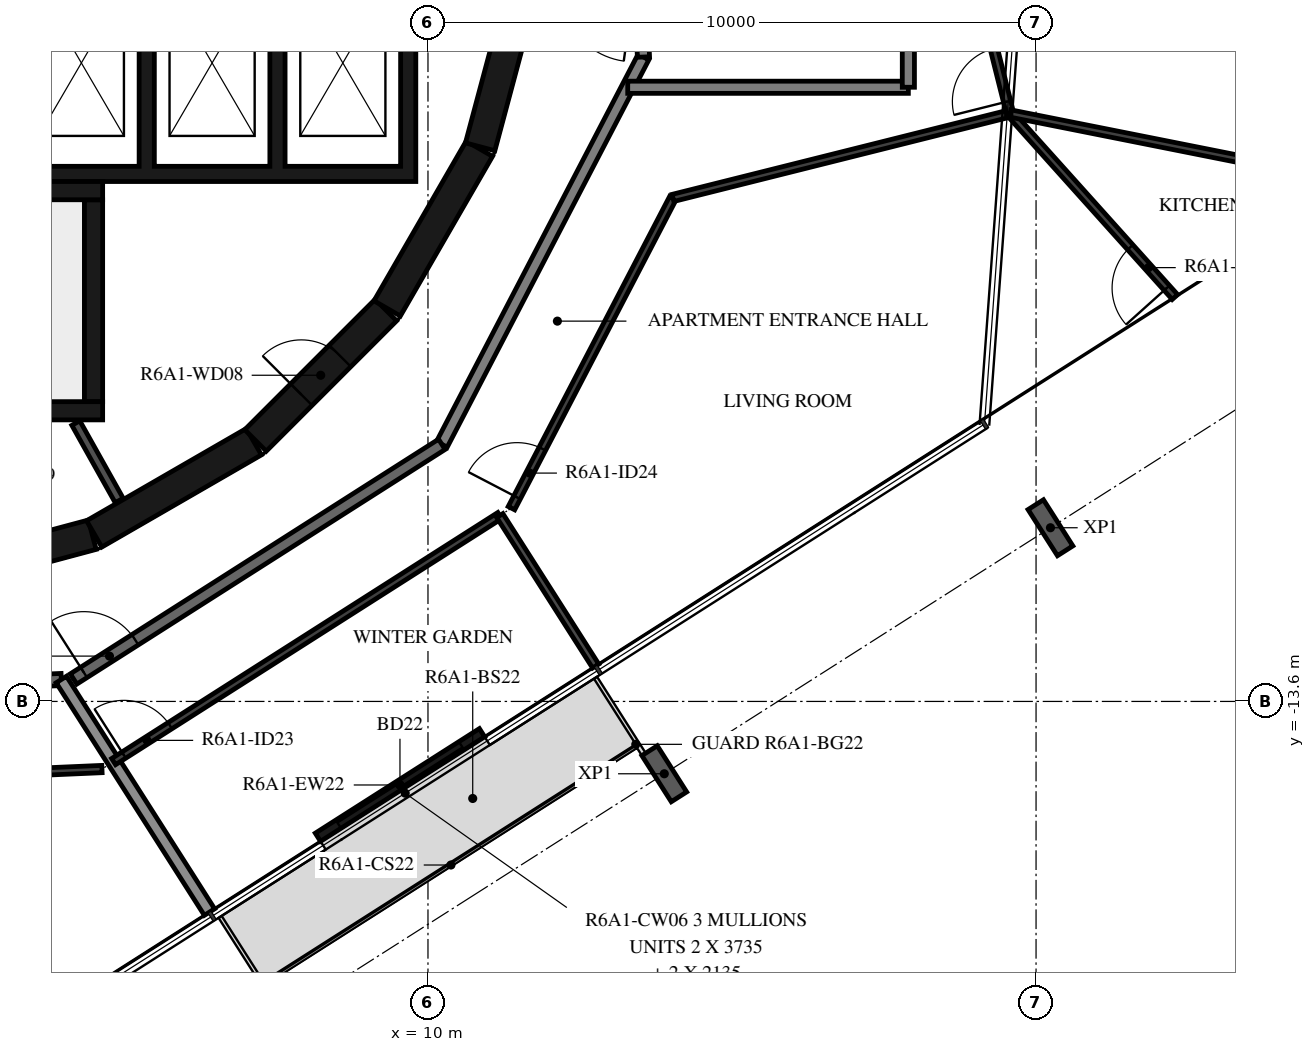
"""IFC4 building model, lengths in metres.
Left out: names, types, materials, properties, quantities, classifications, styles, units other than length and angle.
Written with IfcOpenShell. Run it as: python <this file> out.ifc"""

import sys

from ifc_helpers import new_model, si_unit, direction, frame, frame_2d, origin, origin_2d, place, context, subcontext, project, spatial, polyline, rectangle, i_section, outline, extrude, element, fill, save


model = new_model("IFC4")
c1 = context("Model", 3, precision=1e-05, world=origin(), true_north=direction((0.0, 1.0)))
c2 = subcontext(c1, "Body", "Model", "MODEL_VIEW")
j1 = project(units=[si_unit("LENGTHUNIT", "METRE"), si_unit("PLANEANGLEUNIT", "RADIAN")], contexts=[c1])
p1 = place(None, origin())
s1 = spatial("IfcSite", under=j1, at=p1, CompositionType="ELEMENT")
p2 = place(p1, origin())
s2 = spatial("IfcBuilding", under=s1, at=p2, CompositionType="ELEMENT")
p3 = place(p2, frame((0.0, 0.0, 230.2)))
s3 = spatial("IfcBuildingStorey", under=s2, at=p3, CompositionType="ELEMENT", Elevation=230.2)
for number, where, z_axis, x_axis in (
    (1, (13.886, -14.79, -0.38), (0.0, 0.0, 1.0), (-0.843, -0.537, 0.0)),
    (2, (20.237, -10.744, -0.38), (0.0, 0.0, 1.0), (-0.843, -0.537, 0.0)),
):
    element("IfcColumn", number, at=place(p3, frame(where, z_axis=z_axis, x_axis=x_axis)), inside=s3, PredefinedType="COLUMN", context=c2, shape_type="SweptSolid", body=[
        extrude(i_section(OverallWidth=0.3, OverallDepth=0.9, WebThickness=0.019, FlangeThickness=0.035, FilletRadius=0.03, at=origin_2d()), origin(), (0.0, 0.0, 1.0), 3.5),
    ])
p4 = place(p3, frame((8.19, -15.833, 0.0), z_axis=(0.0, 0.0, 1.0), x_axis=(0.843419508298, 0.53725555653, 0.0)))
e3 = element("IfcWall", 3, at=p4, inside=s3, PredefinedType="STANDARD", context=c2, shape_type="SweptSolid", body=[
    extrude(rectangle(XDim=3.2, YDim=0.16, at=frame_2d((1.6, 0.0))), origin(), (0.0, 0.0, 1.0), 3.12),
])
p5 = place(p4, frame((0.4, 0.0, 0.0)))
e4 = element("IfcOpeningElement", 4, at=p5, cuts=e3, PredefinedType="OPENING", context=c2, shape_type="SweptSolid", body=[
    extrude(rectangle(XDim=2.4, YDim=2.4, at=frame_2d((1.2, 1.2))), frame((0.0, 0.09, 0.0), z_axis=(0.0, -1.0, 0.0), x_axis=(1.0, 0.0, 0.0)), (0.0, 0.0, 1.0), 0.18),
])
p6 = place(p3, frame((1.55, -11.643, 0.0), z_axis=(0.0, 0.0, 1.0), x_axis=(0.965948410781, 0.258734743916, 0.0)))
e5 = element("IfcWall", 5, at=p6, inside=s3, PredefinedType="SHEAR", context=c2, shape_type="SweptSolid", body=[
    extrude(rectangle(XDim=3.033, YDim=0.5, at=frame_2d((1.516, 0.0))), origin(), (0.0, 0.0, 1.0), 3.12),
])
p7 = place(p6, frame((1.066, 0.0, 0.0)))
e6 = element("IfcOpeningElement", 6, at=p7, cuts=e5, PredefinedType="OPENING", context=c2, shape_type="SweptSolid", body=[
    extrude(rectangle(XDim=0.9, YDim=2.1, at=frame_2d((0.45, 1.05))), frame((0.0, 0.26, 0.0), z_axis=(0.0, -1.0, 0.0), x_axis=(1.0, 0.0, 0.0)), (0.0, 0.0, 1.0), 0.52),
])
p8 = place(p3, frame((4.51, -10.845, 0.0), z_axis=(0.0, 0.0, 1.0), x_axis=(0.865975092491, 0.500087131594, 0.0)))
e7 = element("IfcWall", 7, at=p8, inside=s3, PredefinedType="SHEAR", context=c2, shape_type="SweptSolid", body=[
    extrude(rectangle(XDim=3.033, YDim=0.5, at=frame_2d((1.516, 0.0))), origin(), (0.0, 0.0, 1.0), 3.12),
])
p9 = place(p3, frame((7.164, -9.308, 0.0), z_axis=(0.0, 0.0, 1.0), x_axis=(0.707106781187, 0.707106781187, 0.0)))
e8 = element("IfcWall", 8, at=p9, inside=s3, PredefinedType="SHEAR", context=c2, shape_type="SweptSolid", body=[
    extrude(rectangle(XDim=3.032, YDim=0.5, at=frame_2d((1.516, 0.0))), origin(), (0.0, 0.0, 1.0), 3.12),
])
p10 = place(p9, frame((1.066, 0.0, 0.0)))
e9 = element("IfcOpeningElement", 9, at=p10, cuts=e8, PredefinedType="OPENING", context=c2, shape_type="SweptSolid", body=[
    extrude(rectangle(XDim=0.9, YDim=2.1, at=frame_2d((0.45, 1.05))), frame((0.0, 0.26, 0.0), z_axis=(0.0, -1.0, 0.0), x_axis=(1.0, 0.0, 0.0)), (0.0, 0.0, 1.0), 0.52),
])
for number, where, z_axis, x_axis in (
    (10, (9.329, -7.137, 0.0), (0.0, 0.0, 1.0), (0.5, 0.866, 0.0)),
    (11, (10.858, -4.479, 0.0), (0.0, 0.0, 1.0), (0.259, 0.966, 0.0)),
):
    element("IfcWall", number, at=place(p3, frame(where, z_axis=z_axis, x_axis=x_axis)), inside=s3, PredefinedType="SHEAR", context=c2, shape_type="SweptSolid", body=[
        extrude(rectangle(XDim=3.033, YDim=0.5, at=frame_2d((1.516, 0.0))), origin(), (0.0, 0.0, 1.0), 3.12),
    ])
p11 = place(p3, frame((-2.4, -5.2, 0.0), z_axis=(0.0, 0.0, 1.0), x_axis=(1.0, 0.0, 0.0)))
e12 = element("IfcWall", 12, at=p11, inside=s3, PredefinedType="SHEAR", context=c2, shape_type="SweptSolid", body=[
    extrude(rectangle(XDim=7.05, YDim=0.3, at=frame_2d((3.525, 0.0))), origin(), (0.0, 0.0, 1.0), 3.12),
])
p12 = place(p3, frame((4.5, -8.67, 0.0), z_axis=(0.0, 0.0, 1.0), x_axis=(0.0, 1.0, 0.0)))
e13 = element("IfcWall", 13, at=p12, inside=s3, PredefinedType="SHEAR", context=c2, shape_type="SweptSolid", body=[
    extrude(rectangle(XDim=3.32, YDim=0.3, at=frame_2d((1.66, 0.0))), origin(), (0.0, 0.0, 1.0), 3.12),
])
p13 = place(p3, frame((0.1, -8.82, 0.0), z_axis=(0.0, 0.0, 1.0), x_axis=(1.0, 0.0, 0.0)))
e14 = element("IfcWall", 14, at=p13, inside=s3, PredefinedType="SHEAR", context=c2, shape_type="SweptSolid", body=[
    extrude(rectangle(XDim=4.55, YDim=0.3, at=frame_2d((2.275, 0.0))), origin(), (0.0, 0.0, 1.0), 3.12),
])
p14 = place(p3, origin())
e15 = element("IfcWall", 15, at=p14, inside=s3, PredefinedType="SHEAR", context=c2, shape_type="SweptSolid", body=[
    extrude(outline(polyline([(9.8, -5.05), (9.8, -4.8), (9.8, -1.9), (9.55, -1.9), (9.55, -4.8), (7.65, -4.8), (7.65, -1.9), (7.4, -1.9), (7.4, -4.8), (5.5, -4.8), (5.5, -1.9), (5.25, -1.9), (5.25, -4.8), (3.35, -4.8), (3.35, -1.9), (3.1, -1.9), (3.1, -4.8), (1.2, -4.8), (1.2, -1.9), (0.95, -1.9), (0.95, -4.8), (-0.95, -4.8), (-0.95, -1.9), (-1.2, -1.9), (-1.2, -4.8), (-5.25, -4.8), (-5.25, -1.9), (-5.5, -1.9), (-5.5, -4.8), (-7.4, -4.8), (-7.4, -1.9), (-7.65, -1.9), (-7.65, -4.8), (-9.55, -4.8), (-9.55, -1.9), (-9.8, -1.9), (-9.8, -4.8), (-9.8, -5.05), (9.8, -5.05)])), origin(), (0.0, 0.0, 1.0), 3.12),
])
p15 = place(p3, frame((4.922, -10.296, 0.0), z_axis=(0.0, 0.0, 1.0), x_axis=(-0.48860846254, 0.872503163509, 0.0)))
e16 = element("IfcWall", 16, at=p15, inside=s3, PredefinedType="PARTITIONING", context=c2, shape_type="SweptSolid", body=[
    extrude(rectangle(XDim=1.459, YDim=0.15, at=frame_2d((0.73, 0.0))), origin(), (0.0, 0.0, 1.0), 3.12),
])
p16 = place(p3, frame((10.228, -9.372, 0.0), z_axis=(0.0, 0.0, 1.0), x_axis=(0.461759464021, 0.887005184532, 0.0)))
e17 = element("IfcWall", 17, at=p16, inside=s3, PredefinedType="STANDARD", context=c2, shape_type="SweptSolid", body=[
    extrude(rectangle(XDim=7.181, YDim=0.2, at=frame_2d((3.591, 0.0))), origin(), (0.0, 0.0, 1.0), 3.12),
])
p17 = place(p3, frame((13.544, -3.003, 0.0), z_axis=(0.0, 0.0, 1.0), x_axis=(-0.043666917606, 0.999046145234, 0.0)))
e18 = element("IfcWall", 18, at=p17, inside=s3, PredefinedType="STANDARD", context=c2, shape_type="SweptSolid", body=[
    extrude(rectangle(XDim=1.107, YDim=0.2, at=frame_2d((0.553, 0.0))), origin(), (0.0, 0.0, 1.0), 3.12),
])
p18 = place(p3, frame((-3.003, -13.544, 0.0), z_axis=(0.0, 0.0, 1.0), x_axis=(0.999048221872, 0.043619380718, 0.0)))
e19 = element("IfcWall", 19, at=p18, inside=s3, PredefinedType="STANDARD", context=c2, shape_type="SweptSolid", body=[
    extrude(rectangle(XDim=6.979, YDim=0.2, at=frame_2d((3.49, 0.0))), origin(), (0.0, 0.0, 1.0), 3.12),
])
p19 = place(p18, frame((1.6, 0.0, 0.0)))
e20 = element("IfcOpeningElement", 20, at=p19, cuts=e19, PredefinedType="OPENING", context=c2, shape_type="SweptSolid", body=[
    extrude(rectangle(XDim=1.0, YDim=2.1, at=frame_2d((0.5, 1.05))), frame((0.0, 0.11, 0.0), z_axis=(0.0, -1.0, 0.0), x_axis=(1.0, 0.0, 0.0)), (0.0, 0.0, 1.0), 0.22),
])
p20 = place(p3, frame((4.172, -13.231, 0.0), z_axis=(0.0, 0.0, 1.0), x_axis=(0.843388394728, 0.537304397561, 0.0)))
e21 = element("IfcWall", 21, at=p20, inside=s3, PredefinedType="STANDARD", context=c2, shape_type="SweptSolid", body=[
    extrude(rectangle(XDim=7.181, YDim=0.2, at=frame_2d((3.59, 0.0))), origin(), (0.0, 0.0, 1.0), 3.12),
])
p21 = place(p20, frame((0.2, 0.0, 0.0)))
e22 = element("IfcOpeningElement", 22, at=p21, cuts=e21, PredefinedType="OPENING", context=c2, shape_type="SweptSolid", body=[
    extrude(rectangle(XDim=1.0, YDim=2.1, at=frame_2d((0.5, 1.05))), frame((0.0, 0.11, 0.0), z_axis=(0.0, -1.0, 0.0), x_axis=(1.0, 0.0, 0.0)), (0.0, 0.0, 1.0), 0.22),
])
p22 = place(p3, frame((13.285, -3.5, 0.0), z_axis=(0.0, 0.0, 1.0), x_axis=(1.0, 0.0, 0.0)))
e23 = element("IfcWall", 23, at=p22, inside=s3, PredefinedType="STANDARD", context=c2, shape_type="SweptSolid", body=[
    extrude(rectangle(XDim=4.615, YDim=0.2, at=frame_2d((2.308, 0.0))), origin(), (0.0, 0.0, 1.0), 3.12),
])
p23 = place(p3, frame((17.9, -3.5, 0.0), z_axis=(0.0, 0.0, 1.0), x_axis=(0.0, 1.0, 0.0)))
e24 = element("IfcWall", 24, at=p23, inside=s3, PredefinedType="STANDARD", context=c2, shape_type="SweptSolid", body=[
    extrude(rectangle(XDim=1.728, YDim=0.2, at=frame_2d((0.864, 0.0))), origin(), (0.0, 0.0, 1.0), 3.12),
])
p24 = place(p3, frame((6.407, -17.064, 0.0), z_axis=(0.0, 0.0, 1.0), x_axis=(-0.537324777979, 0.843375410461, 0.0)))
e25 = element("IfcWall", 25, at=p24, inside=s3, PredefinedType="STANDARD", context=c2, shape_type="SweptSolid", body=[
    extrude(rectangle(XDim=4.535, YDim=0.2, at=frame_2d((2.268, 0.0))), origin(), (0.0, 0.0, 1.0), 2.73),
])
p25 = place(p3, frame((-3.339, -15.06, 0.0), z_axis=(0.0, 0.0, 1.0), x_axis=(0.999047716945, 0.043630943905, 0.0)))
e26 = element("IfcWall", 26, at=p25, inside=s3, PredefinedType="PARTITIONING", context=c2, shape_type="SweptSolid", body=[
    extrude(rectangle(XDim=7.985, YDim=0.12, at=frame_2d((3.992, 0.0))), origin(), (0.0, 0.0, 1.0), 3.12),
])
p26 = place(p25, frame((3.654, 0.0, 0.0)))
e27 = element("IfcOpeningElement", 27, at=p26, cuts=e26, PredefinedType="OPENING", context=c2, shape_type="SweptSolid", body=[
    extrude(rectangle(XDim=0.9, YDim=2.1, at=frame_2d((0.45, 1.05))), frame((0.0, 0.07, 0.0), z_axis=(0.0, -1.0, 0.0), x_axis=(1.0, 0.0, 0.0)), (0.0, 0.0, 1.0), 0.14),
])
p27 = place(p3, frame((4.83, -14.59, 0.0), z_axis=(0.0, 0.0, 1.0), x_axis=(0.843393042763, 0.537297101629, 0.0)))
e28 = element("IfcWall", 28, at=p27, inside=s3, PredefinedType="PARTITIONING", context=c2, shape_type="SweptSolid", body=[
    extrude(rectangle(XDim=7.53, YDim=0.12, at=frame_2d((3.765, 0.0))), origin(), (0.0, 0.0, 1.0), 3.12),
])
p28 = place(p27, frame((0.2, 0.0, 0.0)))
e29 = element("IfcOpeningElement", 29, at=p28, cuts=e28, PredefinedType="OPENING", context=c2, shape_type="SweptSolid", body=[
    extrude(rectangle(XDim=0.9, YDim=2.1, at=frame_2d((0.45, 1.05))), frame((0.0, 0.07, 0.0), z_axis=(0.0, -1.0, 0.0), x_axis=(1.0, 0.0, 0.0)), (0.0, 0.0, 1.0), 0.14),
])
p29 = place(p3, frame((11.373, -10.421, 0.0), z_axis=(0.0, 0.0, 1.0), x_axis=(0.461738939635, 0.887015868869, 0.0)))
e30 = element("IfcWall", 30, at=p29, inside=s3, PredefinedType="PARTITIONING", context=c2, shape_type="SweptSolid", body=[
    extrude(rectangle(XDim=5.752, YDim=0.12, at=frame_2d((2.876, 0.0))), origin(), (0.0, 0.0, 1.0), 3.12),
])
p30 = place(p29, frame((0.2, 0.0, 0.0)))
e31 = element("IfcOpeningElement", 31, at=p30, cuts=e30, PredefinedType="OPENING", context=c2, shape_type="SweptSolid", body=[
    extrude(rectangle(XDim=0.9, YDim=2.1, at=frame_2d((0.45, 1.05))), frame((0.0, 0.07, 0.0), z_axis=(0.0, -1.0, 0.0), x_axis=(1.0, 0.0, 0.0)), (0.0, 0.0, 1.0), 0.14),
])
p31 = place(p3, frame((14.029, -5.32, 0.0), z_axis=(0.0, 0.0, 1.0), x_axis=(0.969999099814, 0.243108507378, 0.0)))
e32 = element("IfcWall", 32, at=p31, inside=s3, PredefinedType="PARTITIONING", context=c2, shape_type="SweptSolid", body=[
    extrude(rectangle(XDim=5.715, YDim=0.12, at=frame_2d((2.857, 0.0))), origin(), (0.0, 0.0, 1.0), 3.12),
])
p32 = place(p3, frame((19.573, -3.93, 0.0), z_axis=(0.0, 0.0, 1.0), x_axis=(-0.243155959183, 0.96998720585, 0.0)))
e33 = element("IfcWall", 33, at=p32, inside=s3, PredefinedType="PARTITIONING", context=c2, shape_type="SweptSolid", body=[
    extrude(rectangle(XDim=2.5, YDim=0.12, at=frame_2d((1.25, 0.0))), origin(), (0.0, 0.0, 1.0), 3.12),
])
p33 = place(p32, frame((0.2, 0.0, 0.0)))
e34 = element("IfcOpeningElement", 34, at=p33, cuts=e33, PredefinedType="OPENING", context=c2, shape_type="SweptSolid", body=[
    extrude(rectangle(XDim=0.9, YDim=2.1, at=frame_2d((0.45, 1.05))), frame((0.0, 0.07, 0.0), z_axis=(0.0, -1.0, 0.0), x_axis=(1.0, 0.0, 0.0)), (0.0, 0.0, 1.0), 0.14),
])
p34 = place(p3, frame((12.758, -13.018, 0.0), z_axis=(0.0, 0.0, 1.0), x_axis=(-0.537338423153, 0.843366716798, 0.0)))
e35 = element("IfcWall", 35, at=p34, inside=s3, PredefinedType="PARTITIONING", context=c2, shape_type="SweptSolid", body=[
    extrude(rectangle(XDim=2.934, YDim=0.12, at=frame_2d((1.467, 0.0))), origin(), (0.0, 0.0, 1.0), 2.73),
])
p35 = place(p3, frame((22.284, -6.949, 0.0), z_axis=(0.0, 0.0, 1.0), x_axis=(-0.668156639948, 0.744020634454, 0.0)))
e36 = element("IfcWall", 36, at=p35, inside=s3, PredefinedType="PARTITIONING", context=c2, shape_type="SweptSolid", body=[
    extrude(rectangle(XDim=4.058, YDim=0.12, at=frame_2d((2.029, 0.0))), origin(), (0.0, 0.0, 1.0), 3.12),
])
p36 = place(p35, frame((0.2, 0.0, 0.0)))
e37 = element("IfcOpeningElement", 37, at=p36, cuts=e36, PredefinedType="OPENING", context=c2, shape_type="SweptSolid", body=[
    extrude(rectangle(XDim=0.9, YDim=2.1, at=frame_2d((0.45, 1.05))), frame((0.0, 0.07, 0.0), z_axis=(0.0, -1.0, 0.0), x_axis=(1.0, 0.0, 0.0)), (0.0, 0.0, 1.0), 0.14),
])
p37 = place(p3, frame((25.021, -5.015, 0.0), z_axis=(0.0, 0.0, 1.0), x_axis=(-0.98075605246, 0.195237203328, 0.0)))
e38 = element("IfcWall", 38, at=p37, inside=s3, PredefinedType="PARTITIONING", context=c2, shape_type="SweptSolid", body=[
    extrude(rectangle(XDim=5.556, YDim=0.12, at=frame_2d((2.778, 0.0))), origin(), (0.0, 0.0, 1.0), 3.12),
])
p38 = place(p5, origin())
e39 = element("IfcDoor", 39, at=p38, inside=s3, OperationType="DOUBLE_DOOR_SLIDING", PredefinedType="DOOR", context=c2, shape_type="SweptSolid", body=[
    extrude(rectangle(XDim=2.4, YDim=2.4, at=frame_2d((1.2, 1.2))), frame((0.0, 0.025, 0.0), z_axis=(0.0, -1.0, 0.0), x_axis=(1.0, 0.0, 0.0)), (0.0, 0.0, 1.0), 0.05),
])
fill(e4, e39)
p39 = place(p10, origin())
e40 = element("IfcDoor", 40, at=p39, inside=s3, OperationType="SINGLE_SWING_RIGHT", PredefinedType="DOOR", context=c2, shape_type="SweptSolid", body=[
    extrude(rectangle(XDim=0.9, YDim=2.1, at=frame_2d((0.45, 1.05))), frame((0.0, 0.025, 0.0), z_axis=(0.0, -1.0, 0.0), x_axis=(1.0, 0.0, 0.0)), (0.0, 0.0, 1.0), 0.05),
])
fill(e9, e40)
p40 = place(p21, origin())
e41 = element("IfcDoor", 41, at=p40, inside=s3, OperationType="SINGLE_SWING_LEFT", PredefinedType="DOOR", context=c2, shape_type="SweptSolid", body=[
    extrude(rectangle(XDim=1.0, YDim=2.1, at=frame_2d((0.5, 1.05))), frame((0.0, 0.025, 0.0), z_axis=(0.0, -1.0, 0.0), x_axis=(1.0, 0.0, 0.0)), (0.0, 0.0, 1.0), 0.05),
])
fill(e22, e41)
p41 = place(p28, origin())
e42 = element("IfcDoor", 42, at=p41, inside=s3, OperationType="SINGLE_SWING_LEFT", PredefinedType="DOOR", context=c2, shape_type="SweptSolid", body=[
    extrude(rectangle(XDim=0.9, YDim=2.1, at=frame_2d((0.45, 1.05))), frame((0.0, 0.025, 0.0), z_axis=(0.0, -1.0, 0.0), x_axis=(1.0, 0.0, 0.0)), (0.0, 0.0, 1.0), 0.05),
])
fill(e29, e42)
p42 = place(p30, origin())
e43 = element("IfcDoor", 43, at=p42, inside=s3, OperationType="SINGLE_SWING_RIGHT", PredefinedType="DOOR", context=c2, shape_type="SweptSolid", body=[
    extrude(rectangle(XDim=0.9, YDim=2.1, at=frame_2d((0.45, 1.05))), frame((0.0, 0.025, 0.0), z_axis=(0.0, -1.0, 0.0), x_axis=(1.0, 0.0, 0.0)), (0.0, 0.0, 1.0), 0.05),
])
fill(e31, e43)
p43 = place(p33, origin())
e44 = element("IfcDoor", 44, at=p43, inside=s3, OperationType="SINGLE_SWING_RIGHT", PredefinedType="DOOR", context=c2, shape_type="SweptSolid", body=[
    extrude(rectangle(XDim=0.9, YDim=2.1, at=frame_2d((0.45, 1.05))), frame((0.0, 0.025, 0.0), z_axis=(0.0, -1.0, 0.0), x_axis=(1.0, 0.0, 0.0)), (0.0, 0.0, 1.0), 0.05),
])
fill(e34, e44)
p44 = place(p36, origin())
e45 = element("IfcDoor", 45, at=p44, inside=s3, OperationType="SINGLE_SWING_RIGHT", PredefinedType="DOOR", context=c2, shape_type="SweptSolid", body=[
    extrude(rectangle(XDim=0.9, YDim=2.1, at=frame_2d((0.45, 1.05))), frame((0.0, 0.025, 0.0), z_axis=(0.0, -1.0, 0.0), x_axis=(1.0, 0.0, 0.0)), (0.0, 0.0, 1.0), 0.05),
])
fill(e37, e45)
save(model, sys.argv[1])
